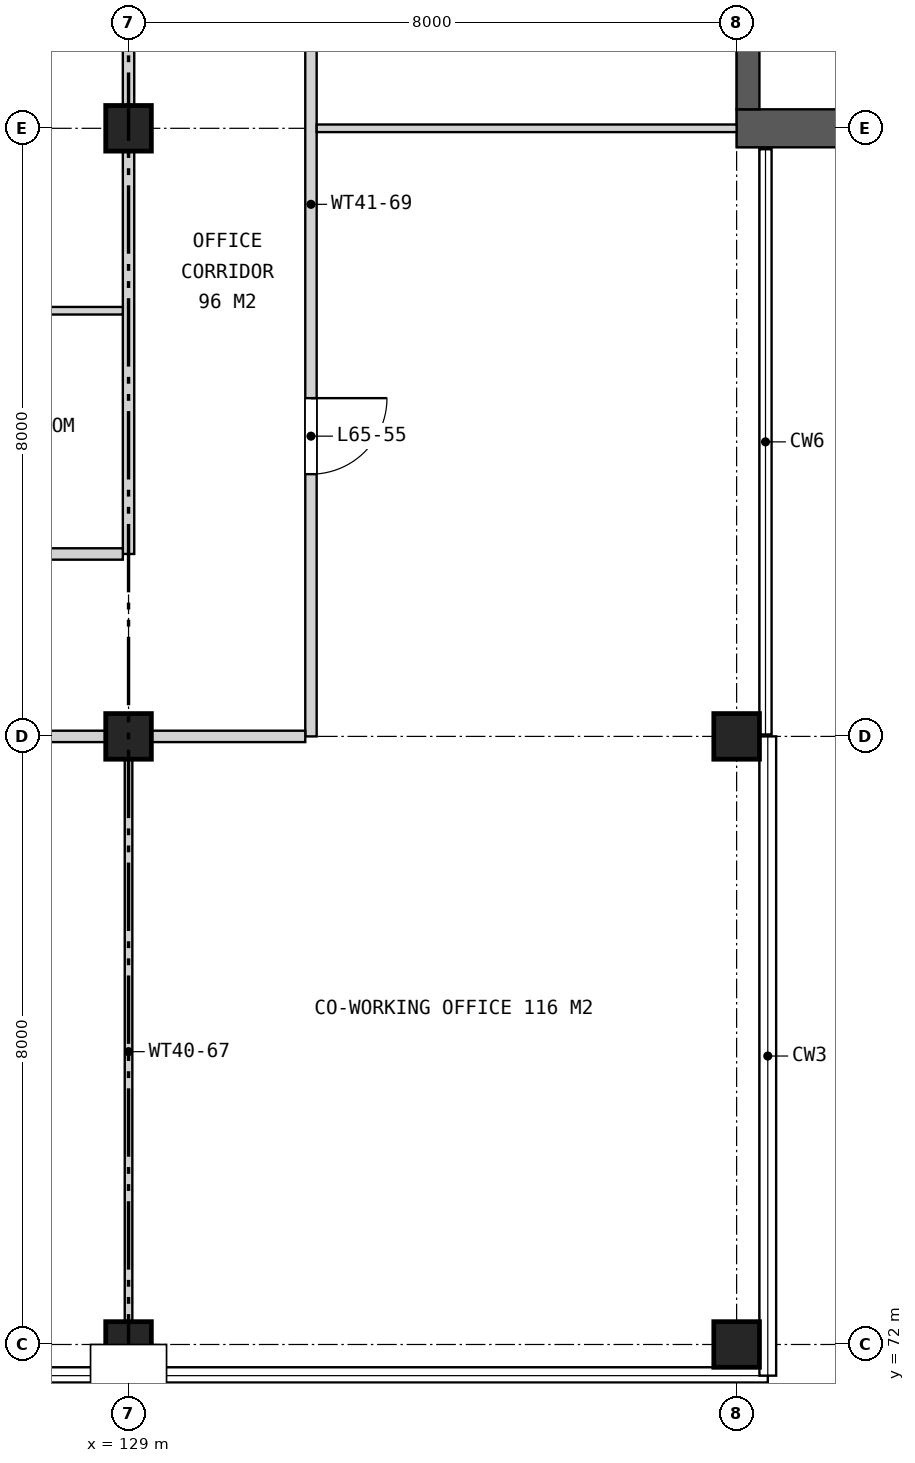
"""IFC4 building model, lengths in metres.
Left out: names, types, materials, properties, quantities, classifications, styles, units other than length and angle.
Written with IfcOpenShell. Run it as: python <this file> out.ifc"""

import sys

from ifc_helpers import new_model, si_unit, direction, frame, frame_2d, origin, origin_2d, place, context, subcontext, project, spatial, rectangle, extrude, element, fill, save


model = new_model("IFC4")
c1 = context("Model", 3, precision=1e-05, world=origin(), true_north=direction((0.0, 1.0)))
c2 = subcontext(c1, "Body", "Model", "MODEL_VIEW")
j1 = project(units=[si_unit("LENGTHUNIT", "METRE"), si_unit("PLANEANGLEUNIT", "RADIAN")], contexts=[c1])
p1 = place(None, origin())
s1 = spatial("IfcSite", under=j1, at=p1, CompositionType="ELEMENT")
p2 = place(p1, origin())
s2 = spatial("IfcBuilding", under=s1, at=p2, CompositionType="ELEMENT")
p3 = place(p2, frame((0.0, 0.0, 299.7)))
s3 = spatial("IfcBuildingStorey", under=s2, at=p3, CompositionType="ELEMENT", Elevation=299.7)
for number, where, z_axis, x_axis in (
    (1, (129.0, 72.0, 0.0), (0.0, 0.0, 1.0), (1.0, 0.0, 0.0)),
    (2, (129.0, 80.0, 0.0), (0.0, 0.0, 1.0), (1.0, 0.0, 0.0)),
    (3, (129.0, 88.0, 0.0), (0.0, 0.0, 1.0), (1.0, 0.0, 0.0)),
    (4, (137.0, 72.0, 0.0), (0.0, 0.0, 1.0), (1.0, 0.0, 0.0)),
    (5, (137.0, 80.0, 0.0), (0.0, 0.0, 1.0), (1.0, 0.0, 0.0)),
):
    element("IfcColumn", number, at=place(p3, frame(where, z_axis=z_axis, x_axis=x_axis)), inside=s3, PredefinedType="COLUMN", context=c2, shape_type="SweptSolid", body=[
        extrude(rectangle(XDim=0.6, YDim=0.6, at=origin_2d()), origin(), (0.0, 0.0, 1.0), 4.2),
    ])
p4 = place(p3, frame((137.0, 88.0, 0.0), z_axis=(0.0, 0.0, 1.0), x_axis=(1.0, 0.0, 0.0)))
e6 = element("IfcWall", 6, at=p4, inside=s3, PredefinedType="SHEAR", context=c2, shape_type="SweptSolid", body=[
    extrude(rectangle(XDim=7.1, YDim=0.5, at=frame_2d((3.55, 0.0))), origin(), (0.0, 0.0, 1.0), 4.2),
])
p5 = place(p3, frame((137.15, 88.25, 0.0), z_axis=(0.0, 0.0, 1.0), x_axis=(0.0, 1.0, 0.0)))
e7 = element("IfcWall", 7, at=p5, inside=s3, PredefinedType="SHEAR", context=c2, shape_type="SweptSolid", body=[
    extrude(rectangle(XDim=6.05, YDim=0.3, at=frame_2d((3.025, 0.0))), origin(), (0.0, 0.0, 1.0), 4.2),
])
p6 = place(p3, frame((129.0, 71.78, 0.0), z_axis=(0.0, 0.0, 1.0), x_axis=(0.0, 1.0, 0.0)))
e8 = element("IfcWall", 8, at=p6, inside=s3, PredefinedType="PARTITIONING", context=c2, shape_type="SweptSolid", body=[
    extrude(rectangle(XDim=8.145, YDim=0.1, at=frame_2d((4.073, 0.0))), origin(), (0.0, 0.0, 1.0), 3.255),
])
p7 = place(p3, frame((129.0, 82.4, 0.0), z_axis=(0.0, 0.0, 1.0), x_axis=(0.0, 1.0, 0.0)))
e9 = element("IfcWall", 9, at=p7, inside=s3, PredefinedType="PARTITIONING", context=c2, shape_type="SweptSolid", body=[
    extrude(rectangle(XDim=35.2, YDim=0.15, at=frame_2d((17.6, 0.0))), origin(), (0.0, 0.0, 1.0), 3.255),
])
p8 = place(p7, frame((10.75, 0.0, 0.0)))
e10 = element("IfcOpeningElement", 10, at=p8, cuts=e9, PredefinedType="OPENING", context=c2, shape_type="SweptSolid", body=[
    extrude(rectangle(XDim=1.0, YDim=2.1, at=frame_2d((0.5, 1.05))), frame((0.0, 0.085, 0.0), z_axis=(0.0, -1.0, 0.0), x_axis=(1.0, 0.0, 0.0)), (0.0, 0.0, 1.0), 0.17),
])
p9 = place(p7, frame((17.45, 0.0, 0.0)))
e11 = element("IfcOpeningElement", 11, at=p9, cuts=e9, PredefinedType="OPENING", context=c2, shape_type="SweptSolid", body=[
    extrude(rectangle(XDim=1.0, YDim=2.1, at=frame_2d((0.5, 1.05))), frame((0.0, 0.085, 0.0), z_axis=(0.0, -1.0, 0.0), x_axis=(1.0, 0.0, 0.0)), (0.0, 0.0, 1.0), 0.17),
])
p10 = place(p7, frame((23.45, 0.0, 0.0)))
e12 = element("IfcOpeningElement", 12, at=p10, cuts=e9, PredefinedType="OPENING", context=c2, shape_type="SweptSolid", body=[
    extrude(rectangle(XDim=1.0, YDim=2.1, at=frame_2d((0.5, 1.05))), frame((0.0, 0.085, 0.0), z_axis=(0.0, -1.0, 0.0), x_axis=(1.0, 0.0, 0.0)), (0.0, 0.0, 1.0), 0.17),
])
p11 = place(p3, frame((131.4, 80.0, 0.0), z_axis=(0.0, 0.0, 1.0), x_axis=(0.0, 1.0, 0.0)))
e13 = element("IfcWall", 13, at=p11, inside=s3, PredefinedType="PARTITIONING", context=c2, shape_type="SweptSolid", body=[
    extrude(rectangle(XDim=14.0, YDim=0.15, at=frame_2d((7.0, 0.0))), origin(), (0.0, 0.0, 1.0), 3.255),
])
p12 = place(p11, frame((12.45, 0.0, 0.0)))
e14 = element("IfcOpeningElement", 14, at=p12, cuts=e13, PredefinedType="OPENING", context=c2, shape_type="SweptSolid", body=[
    extrude(rectangle(XDim=1.0, YDim=2.1, at=frame_2d((0.5, 1.05))), frame((0.0, 0.085, 0.0), z_axis=(0.0, -1.0, 0.0), x_axis=(1.0, 0.0, 0.0)), (0.0, 0.0, 1.0), 0.17),
])
p13 = place(p11, frame((9.45, 0.0, 0.0)))
e15 = element("IfcOpeningElement", 15, at=p13, cuts=e13, PredefinedType="OPENING", context=c2, shape_type="SweptSolid", body=[
    extrude(rectangle(XDim=1.0, YDim=2.1, at=frame_2d((0.5, 1.05))), frame((0.0, 0.085, 0.0), z_axis=(0.0, -1.0, 0.0), x_axis=(1.0, 0.0, 0.0)), (0.0, 0.0, 1.0), 0.17),
])
p14 = place(p11, frame((3.45, 0.0, 0.0)))
e16 = element("IfcOpeningElement", 16, at=p14, cuts=e13, PredefinedType="OPENING", context=c2, shape_type="SweptSolid", body=[
    extrude(rectangle(XDim=1.0, YDim=2.1, at=frame_2d((0.5, 1.05))), frame((0.0, 0.085, 0.0), z_axis=(0.0, -1.0, 0.0), x_axis=(1.0, 0.0, 0.0)), (0.0, 0.0, 1.0), 0.17),
])
p15 = place(p3, frame((118.7, 80.0, 0.0), z_axis=(0.0, 0.0, 1.0), x_axis=(1.0, 0.0, 0.0)))
e17 = element("IfcWall", 17, at=p15, inside=s3, PredefinedType="PARTITIONING", context=c2, shape_type="SweptSolid", body=[
    extrude(rectangle(XDim=12.625, YDim=0.15, at=frame_2d((6.312, 0.0))), origin(), (0.0, 0.0, 1.0), 3.255),
])
p16 = place(p15, frame((5.85, 0.0, 0.0)))
e18 = element("IfcOpeningElement", 18, at=p16, cuts=e17, PredefinedType="OPENING", context=c2, shape_type="SweptSolid", body=[
    extrude(rectangle(XDim=1.0, YDim=2.1, at=frame_2d((0.5, 1.05))), frame((0.0, 0.085, 0.0), z_axis=(0.0, -1.0, 0.0), x_axis=(1.0, 0.0, 0.0)), (0.0, 0.0, 1.0), 0.17),
])
p17 = place(p3, frame((121.075, 82.4, 0.0), z_axis=(0.0, 0.0, 1.0), x_axis=(1.0, 0.0, 0.0)))
e19 = element("IfcWall", 19, at=p17, inside=s3, PredefinedType="PARTITIONING", context=c2, shape_type="SweptSolid", body=[
    extrude(rectangle(XDim=7.85, YDim=0.15, at=frame_2d((3.925, 0.0))), origin(), (0.0, 0.0, 1.0), 3.255),
])
p18 = place(p17, frame((3.45, 0.0, 0.0)))
e20 = element("IfcOpeningElement", 20, at=p18, cuts=e19, PredefinedType="OPENING", context=c2, shape_type="SweptSolid", body=[
    extrude(rectangle(XDim=1.0, YDim=2.1, at=frame_2d((0.5, 1.05))), frame((0.0, 0.085, 0.0), z_axis=(0.0, -1.0, 0.0), x_axis=(1.0, 0.0, 0.0)), (0.0, 0.0, 1.0), 0.17),
])
p19 = place(p3, frame((121.075, 85.6, 0.0), z_axis=(0.0, 0.0, 1.0), x_axis=(1.0, 0.0, 0.0)))
e21 = element("IfcWall", 21, at=p19, inside=s3, PredefinedType="PARTITIONING", context=c2, shape_type="SweptSolid", body=[
    extrude(rectangle(XDim=7.85, YDim=0.1, at=frame_2d((3.925, 0.0))), origin(), (0.0, 0.0, 1.0), 3.255),
])
p20 = place(p3, frame((131.475, 88.0, 0.0), z_axis=(0.0, 0.0, 1.0), x_axis=(1.0, 0.0, 0.0)))
e22 = element("IfcWall", 22, at=p20, inside=s3, PredefinedType="PARTITIONING", context=c2, shape_type="SweptSolid", body=[
    extrude(rectangle(XDim=5.525, YDim=0.1, at=frame_2d((2.762, 0.0))), origin(), (0.0, 0.0, 1.0), 3.255),
])
p21 = place(p14, frame((1.0, 0.0, 0.0), z_axis=(0.0, 0.0, 1.0), x_axis=(-1.0, 0.0, 0.0)))
e23 = element("IfcDoor", 23, at=p21, inside=s3, OperationType="SINGLE_SWING_LEFT", PredefinedType="DOOR", context=c2, shape_type="SweptSolid", body=[
    extrude(rectangle(XDim=1.0, YDim=2.1, at=frame_2d((0.5, 1.05))), frame((0.0, 0.025, 0.0), z_axis=(0.0, -1.0, 0.0), x_axis=(1.0, 0.0, 0.0)), (0.0, 0.0, 1.0), 0.05),
])
fill(e16, e23)
save(model, sys.argv[1])
